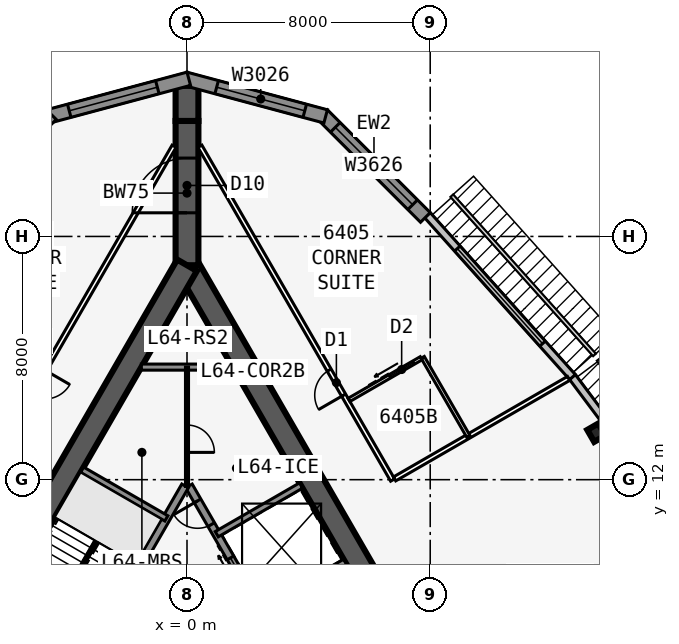
"""IFC4 building model, lengths in metres.
Left out: names, types, materials, properties, quantities, classifications, styles, units other than length and angle.
Written with IfcOpenShell. Run it as: python <this file> out.ifc"""

import sys

from ifc_helpers import new_model, si_unit, direction, frame, frame_2d, origin, origin_2d, place, context, subcontext, project, spatial, polyline, rectangle, i_section, outline, extrude, element, fill, save


model = new_model("IFC4")
c1 = context("Model", 3, precision=1e-05, world=origin(), true_north=direction((0.0, 1.0)))
c2 = subcontext(c1, "Body", "Model", "MODEL_VIEW")
j1 = project(units=[si_unit("LENGTHUNIT", "METRE"), si_unit("PLANEANGLEUNIT", "RADIAN")], contexts=[c1])
p1 = place(None, origin())
s1 = spatial("IfcSite", under=j1, at=p1, CompositionType="ELEMENT")
p2 = place(p1, origin())
s2 = spatial("IfcBuilding", under=s1, at=p2, CompositionType="ELEMENT")
p3 = place(p2, frame((0.0, 0.0, 242.9)))
s3 = spatial("IfcBuildingStorey", under=s2, at=p3, CompositionType="ELEMENT", Elevation=242.9)
p4 = place(p3, frame((16.5, -9.526, 0.0), z_axis=(0.0, 0.0, 1.0), x_axis=(-0.499999749417, 0.866025548458, 0.0)))
e1 = element("IfcWall", 1, at=p4, inside=s3, PredefinedType="SHEAR", context=c2, shape_type="SweptSolid", body=[
    extrude(rectangle(XDim=33.0, YDim=0.75, at=frame_2d((16.5, 0.0))), origin(), (0.0, 0.0, 1.0), 3.6),
])
p5 = place(p4, frame((14.15, 0.0, 0.0)))
e2 = element("IfcOpeningElement", 2, at=p5, cuts=e1, PredefinedType="OPENING", context=c2, shape_type="SweptSolid", body=[
    extrude(rectangle(XDim=1.8, YDim=2.13, at=frame_2d((0.9, 1.065))), frame((0.0, 0.385, 0.0), z_axis=(0.0, -1.0, 0.0), x_axis=(1.0, 0.0, 0.0)), (0.0, 0.0, 1.0), 0.77),
])
p6 = place(p4, frame((12.6, 0.0, 0.0)))
e3 = element("IfcOpeningElement", 3, at=p6, cuts=e1, PredefinedType="OPENING", context=c2, shape_type="SweptSolid", body=[
    extrude(rectangle(XDim=1.0, YDim=2.13, at=frame_2d((0.5, 1.065))), frame((0.0, 0.385, 0.0), z_axis=(0.0, -1.0, 0.0), x_axis=(1.0, 0.0, 0.0)), (0.0, 0.0, 1.0), 0.77),
])
p7 = place(p3, frame((5.379, 2.586, 0.0), z_axis=(0.0, 0.0, 1.0), x_axis=(-0.500001375892, 0.866024609411, 0.0)))
e4 = element("IfcWall", 4, at=p7, inside=s3, PredefinedType="SOLIDWALL", context=c2, shape_type="SweptSolid", body=[
    extrude(rectangle(XDim=10.633, YDim=0.25, at=frame_2d((5.316, 0.0))), origin(), (0.0, 0.0, 1.0), 3.435),
])
p8 = place(p7, frame((9.164, 0.0, 0.0)))
e5 = element("IfcOpeningElement", 5, at=p8, cuts=e4, PredefinedType="OPENING", context=c2, shape_type="SweptSolid", body=[
    extrude(rectangle(XDim=0.9, YDim=2.13, at=frame_2d((0.45, 1.065))), frame((0.0, 0.135, 0.0), z_axis=(0.0, -1.0, 0.0), x_axis=(1.0, 0.0, 0.0)), (0.0, 0.0, 1.0), 0.27),
])
p9 = place(p7, frame((1.0, 0.0, 0.0)))
e6 = element("IfcOpeningElement", 6, at=p9, cuts=e4, PredefinedType="OPENING", context=c2, shape_type="SweptSolid", body=[
    extrude(rectangle(XDim=1.1, YDim=2.13, at=frame_2d((0.55, 1.065))), frame((0.0, 0.135, 0.0), z_axis=(0.0, -1.0, 0.0), x_axis=(1.0, 0.0, 0.0)), (0.0, 0.0, 1.0), 0.27),
])
p10 = place(p7, frame((3.9, 0.0, 0.0)))
e7 = element("IfcOpeningElement", 7, at=p10, cuts=e4, PredefinedType="OPENING", context=c2, shape_type="SweptSolid", body=[
    extrude(rectangle(XDim=1.1, YDim=2.13, at=frame_2d((0.55, 1.065))), frame((0.0, 0.135, 0.0), z_axis=(0.0, -1.0, 0.0), x_axis=(1.0, 0.0, 0.0)), (0.0, 0.0, 1.0), 0.27),
])
p11 = place(p7, frame((6.8, 0.0, 0.0)))
e8 = element("IfcOpeningElement", 8, at=p11, cuts=e4, PredefinedType="OPENING", context=c2, shape_type="SweptSolid", body=[
    extrude(rectangle(XDim=1.1, YDim=2.13, at=frame_2d((0.55, 1.065))), frame((0.0, 0.135, 0.0), z_axis=(0.0, -1.0, 0.0), x_axis=(1.0, 0.0, 0.0)), (0.0, 0.0, 1.0), 0.27),
])
for number, where, z_axis, x_axis in (
    (9, (2.429, 7.696, 0.0), (0.0, 0.0, 1.0), (0.866, 0.5, 0.0)),
    (10, (0.979, 10.207, 0.0), (0.0, 0.0, 1.0), (0.866, 0.5, 0.0)),
):
    element("IfcWall", number, at=place(p3, frame(where, z_axis=z_axis, x_axis=x_axis)), inside=s3, PredefinedType="SOLIDWALL", context=c2, shape_type="SweptSolid", body=[
        extrude(rectangle(XDim=3.2, YDim=0.2, at=frame_2d((1.6, 0.0))), origin(), (0.0, 0.0, 1.0), 3.435),
    ])
p12 = place(p3, frame((0.0, 19.052, 0.0), z_axis=(0.0, 0.0, 1.0), x_axis=(-0.499999749417, -0.866025548458, 0.0)))
e11 = element("IfcWall", 11, at=p12, inside=s3, PredefinedType="SHEAR", context=c2, shape_type="SweptSolid", body=[
    extrude(rectangle(XDim=33.0, YDim=0.75, at=frame_2d((16.5, 0.0))), origin(), (0.0, 0.0, 1.0), 3.6),
])
p13 = place(p12, frame((14.15, 0.0, 0.0)))
e12 = element("IfcOpeningElement", 12, at=p13, cuts=e11, PredefinedType="OPENING", context=c2, shape_type="SweptSolid", body=[
    extrude(rectangle(XDim=1.8, YDim=2.13, at=frame_2d((0.9, 1.065))), frame((0.0, 0.385, 0.0), z_axis=(0.0, -1.0, 0.0), x_axis=(1.0, 0.0, 0.0)), (0.0, 0.0, 1.0), 0.77),
])
p14 = place(p12, frame((12.6, 0.0, 0.0)))
e13 = element("IfcOpeningElement", 13, at=p14, cuts=e11, PredefinedType="OPENING", context=c2, shape_type="SweptSolid", body=[
    extrude(rectangle(XDim=1.0, YDim=2.13, at=frame_2d((0.5, 1.065))), frame((0.0, 0.385, 0.0), z_axis=(0.0, -1.0, 0.0), x_axis=(1.0, 0.0, 0.0)), (0.0, 0.0, 1.0), 0.77),
])
p15 = place(p3, frame((-0.062, 11.794, 0.0), z_axis=(0.0, 0.0, 1.0), x_axis=(-0.500006680225, -0.86602154692, 0.0)))
e14 = element("IfcWall", 14, at=p15, inside=s3, PredefinedType="SOLIDWALL", context=c2, shape_type="SweptSolid", body=[
    extrude(rectangle(XDim=7.733, YDim=0.25, at=frame_2d((3.866, 0.0))), origin(), (0.0, 0.0, 1.0), 3.435),
])
p16 = place(p3, frame((-0.679, 10.727, 0.0), z_axis=(0.0, 0.0, 1.0), x_axis=(-0.866008981251, 0.500028443584, 0.0)))
e15 = element("IfcWall", 15, at=p16, inside=s3, PredefinedType="SOLIDWALL", context=c2, shape_type="SweptSolid", body=[
    extrude(rectangle(XDim=3.2, YDim=0.2, at=frame_2d((1.6, 0.0))), origin(), (0.0, 0.0, 1.0), 3.435),
])
p17 = place(p3, frame((0.0, 19.052, 0.0), z_axis=(0.0, 0.0, 1.0), x_axis=(0.0, 1.0, 0.0)))
e16 = element("IfcWall", 16, at=p17, inside=s3, PredefinedType="SHEAR", context=c2, shape_type="SweptSolid", body=[
    extrude(rectangle(XDim=4.746, YDim=0.75, at=frame_2d((2.373, 0.0))), origin(), (0.0, 0.0, 1.0), 3.6),
])
p18 = place(p17, frame((1.725, 0.0, 0.0)))
e17 = element("IfcOpeningElement", 17, at=p18, cuts=e16, PredefinedType="OPENING", context=c2, shape_type="SweptSolid", body=[
    extrude(rectangle(XDim=1.8, YDim=2.13, at=frame_2d((0.9, 1.065))), frame((0.0, 0.385, 0.0), z_axis=(0.0, -1.0, 0.0), x_axis=(1.0, 0.0, 0.0)), (0.0, 0.0, 1.0), 0.77),
])
p19 = place(p3, frame((0.0, 23.799, 0.0), z_axis=(0.0, 0.0, 1.0), x_axis=(0.0, 1.0, 0.0)))
e18 = element("IfcWall", 18, at=p19, inside=s3, PredefinedType="SHEAR", context=c2, shape_type="SweptSolid", body=[
    extrude(rectangle(XDim=1.155, YDim=0.75, at=frame_2d((0.577, 0.0))), origin(), (0.0, 0.0, 1.0), 3.6),
])
p20 = place(p3, frame((13.461, 13.545, 0.0), z_axis=(0.0, 0.0, 1.0), x_axis=(0.866025403784, 0.5, 0.0)))
e19 = element("IfcColumn", 19, at=p20, inside=s3, PredefinedType="COLUMN", context=c2, shape_type="SweptSolid", body=[
    extrude(i_section(OverallWidth=0.419, OverallDepth=0.455, WebThickness=0.042, FlangeThickness=0.068, at=origin_2d()), origin(), (0.0, 0.0, 1.0), 3.6),
])
p21 = place(p3, frame((13.881, 13.771, 0.0), z_axis=(0.0, 0.0, 1.0), x_axis=(-0.599650843534, 0.800261748335, 0.0)))
e20 = element("IfcWall", 20, at=p21, inside=s3, PredefinedType="STANDARD", context=c2, shape_type="SweptSolid", body=[
    extrude(rectangle(XDim=2.014, YDim=0.25, at=frame_2d((1.007, 0.0))), origin(), (0.0, 0.0, 1.0), 3.435),
])
p22 = place(p3, frame((12.68, 15.374, 0.0), z_axis=(0.0, 0.0, 1.0), x_axis=(-0.667303550892, 0.744785855778, 0.0)))
e21 = element("IfcWall", 21, at=p22, inside=s3, PredefinedType="STANDARD", context=c2, shape_type="SweptSolid", body=[
    extrude(rectangle(XDim=7.153, YDim=0.25, at=frame_2d((3.576, 0.0))), origin(), (0.0, 0.0, 1.0), 3.435),
])
p23 = place(p22, frame((1.476, 0.0, 0.45)))
e22 = element("IfcOpeningElement", 22, at=p23, cuts=e21, PredefinedType="OPENING", context=c2, shape_type="SweptSolid", body=[
    extrude(rectangle(XDim=4.2, YDim=2.6, at=frame_2d((2.1, 1.3))), frame((0.0, 0.135, 0.0), z_axis=(0.0, -1.0, 0.0), x_axis=(1.0, 0.0, 0.0)), (0.0, 0.0, 1.0), 0.27),
])
p24 = place(p3, frame((7.841, 20.625, 0.0), z_axis=(0.0, 0.0, 1.0), x_axis=(-0.707106781187, 0.707106781187, 0.0)))
e23 = element("IfcWall", 23, at=p24, inside=s3, PredefinedType="SOLIDWALL", context=c2, shape_type="SweptSolid", body=[
    extrude(rectangle(XDim=4.781, YDim=0.45, at=frame_2d((2.391, 0.0))), origin(), (0.0, 0.0, 1.0), 3.435),
])
p25 = place(p24, frame((0.591, 0.0, 0.45)))
e24 = element("IfcOpeningElement", 24, at=p25, cuts=e23, PredefinedType="OPENING", context=c2, shape_type="SweptSolid", body=[
    extrude(rectangle(XDim=3.6, YDim=2.6, at=frame_2d((1.8, 1.3))), frame((0.0, 0.235, 0.0), z_axis=(0.0, -1.0, 0.0), x_axis=(1.0, 0.0, 0.0)), (0.0, 0.0, 1.0), 0.47),
])
p26 = place(p3, frame((4.561, 23.948, 0.0), z_axis=(0.0, 0.0, 1.0), x_axis=(-0.965926628191, 0.258816052347, 0.0)))
e25 = element("IfcWall", 25, at=p26, inside=s3, PredefinedType="SOLIDWALL", context=c2, shape_type="SweptSolid", body=[
    extrude(outline(polyline([(4.781, 0.225), (4.722, 0.225), (4.303, 0.113), (4.273, 0.225), (0.0, 0.225), (0.0, -0.225), (4.781, -0.225), (4.781, 0.225)])), origin(), (0.0, 0.0, 1.0), 3.435),
])
p27 = place(p26, frame((0.711, 0.0, 0.45)))
e26 = element("IfcOpeningElement", 26, at=p27, cuts=e25, PredefinedType="OPENING", context=c2, shape_type="SweptSolid", body=[
    extrude(rectangle(XDim=3.0, YDim=2.6, at=frame_2d((1.5, 1.3))), frame((0.0, 0.235, 0.0), z_axis=(0.0, -1.0, 0.0), x_axis=(1.0, 0.0, 0.0)), (0.0, 0.0, 1.0), 0.47),
])
p28 = place(p3, frame((0.058, 25.186, 0.0), z_axis=(0.0, 0.0, 1.0), x_axis=(-0.965926628191, -0.258816052347, 0.0)))
e27 = element("IfcWall", 27, at=p28, inside=s3, PredefinedType="SOLIDWALL", context=c2, shape_type="SweptSolid", body=[
    extrude(outline(polyline([(4.781, 0.225), (0.509, 0.225), (0.479, 0.113), (0.059, 0.225), (0.0, 0.225), (0.0, -0.225), (4.781, -0.225), (4.781, 0.225)])), origin(), (0.0, 0.0, 1.0), 3.435),
])
p29 = place(p28, frame((1.07, 0.0, 0.45)))
e28 = element("IfcOpeningElement", 28, at=p29, cuts=e27, PredefinedType="OPENING", context=c2, shape_type="SweptSolid", body=[
    extrude(rectangle(XDim=3.0, YDim=2.6, at=frame_2d((1.5, 1.3))), frame((0.0, 0.235, 0.0), z_axis=(0.0, -1.0, 0.0), x_axis=(1.0, 0.0, 0.0)), (0.0, 0.0, 1.0), 0.47),
])
p30 = place(p3, frame((-4.46, 24.007, 0.0), z_axis=(0.0, 0.0, 1.0), x_axis=(-0.707106781187, -0.707106781187, 0.0)))
e29 = element("IfcWall", 29, at=p30, inside=s3, PredefinedType="SOLIDWALL", context=c2, shape_type="SweptSolid", body=[
    extrude(rectangle(XDim=4.781, YDim=0.45, at=frame_2d((2.391, 0.0))), origin(), (0.0, 0.0, 1.0), 3.435),
])
p31 = place(p30, frame((0.591, 0.0, 0.45)))
e30 = element("IfcOpeningElement", 30, at=p31, cuts=e29, PredefinedType="OPENING", context=c2, shape_type="SweptSolid", body=[
    extrude(rectangle(XDim=3.6, YDim=2.6, at=frame_2d((1.8, 1.3))), frame((0.0, 0.235, 0.0), z_axis=(0.0, -1.0, 0.0), x_axis=(1.0, 0.0, 0.0)), (0.0, 0.0, 1.0), 0.47),
])
p32 = place(p3, frame((6.763, 11.988, 0.0), z_axis=(0.0, 0.0, 1.0), x_axis=(-0.49999585592, 0.866027796357, 0.0)))
e31 = element("IfcWall", 31, at=p32, inside=s3, PredefinedType="PARTITIONING", context=c2, shape_type="SweptSolid", body=[
    extrude(rectangle(XDim=12.677, YDim=0.15, at=frame_2d((6.338, 0.0))), origin(), (0.0, 0.0, 1.0), 3.435),
])
p33 = place(p32, frame((3.225, 0.0, 0.0)))
e32 = element("IfcOpeningElement", 32, at=p33, cuts=e31, PredefinedType="OPENING", context=c2, shape_type="SweptSolid", body=[
    extrude(rectangle(XDim=0.95, YDim=2.13, at=frame_2d((0.475, 1.065))), frame((0.0, 0.085, 0.0), z_axis=(0.0, -1.0, 0.0), x_axis=(1.0, 0.0, 0.0)), (0.0, 0.0, 1.0), 0.17),
])
p34 = place(p3, frame((6.829, 12.025, 0.0), z_axis=(0.0, 0.0, 1.0), x_axis=(0.866029323189, 0.499993211332, 0.0)))
e33 = element("IfcWall", 33, at=p34, inside=s3, PredefinedType="PARTITIONING", context=c2, shape_type="SweptSolid", body=[
    extrude(rectangle(XDim=6.608, YDim=0.15, at=frame_2d((3.304, 0.0))), origin(), (0.0, 0.0, 1.0), 2.678),
])
p35 = place(p3, frame((9.253, 13.425, 0.0), z_axis=(0.0, 0.0, 1.0), x_axis=(-0.499990139034, 0.866031096941, 0.0)))
e34 = element("IfcWall", 34, at=p35, inside=s3, PredefinedType="PLUMBINGWALL", context=c2, shape_type="SweptSolid", body=[
    extrude(rectangle(XDim=3.0, YDim=0.12, at=frame_2d((1.5, 0.0))), origin(), (0.0, 0.0, 1.0), 3.435),
])
p36 = place(p3, frame((5.329, 14.623, 0.0), z_axis=(0.0, 0.0, 1.0), x_axis=(0.865997131366, 0.500048966069, 0.0)))
e35 = element("IfcWall", 35, at=p36, inside=s3, PredefinedType="PLUMBINGWALL", context=c2, shape_type="SweptSolid", body=[
    extrude(rectangle(XDim=2.74, YDim=0.12, at=frame_2d((1.37, 0.0))), origin(), (0.0, 0.0, 1.0), 3.435),
])
p37 = place(p36, frame((1.55, 0.0, 0.0)))
e36 = element("IfcOpeningElement", 36, at=p37, cuts=e35, PredefinedType="OPENING", context=c2, shape_type="SweptSolid", body=[
    extrude(rectangle(XDim=0.9, YDim=2.13, at=frame_2d((0.45, 1.065))), frame((0.0, 0.07, 0.0), z_axis=(0.0, -1.0, 0.0), x_axis=(1.0, 0.0, 0.0)), (0.0, 0.0, 1.0), 0.14),
])
p38 = place(p3, frame((-0.425, 22.966, 0.0), z_axis=(0.0, 0.0, 1.0), x_axis=(-0.500000265775, -0.866025250339, 0.0)))
e37 = element("IfcWall", 37, at=p38, inside=s3, PredefinedType="PARTITIONING", context=c2, shape_type="SweptSolid", body=[
    extrude(rectangle(XDim=39.354, YDim=0.15, at=frame_2d((19.677, 0.0))), origin(), (0.0, 0.0, 1.0), 3.435),
])
p39 = place(p38, frame((8.502, 0.0, 0.0)))
e38 = element("IfcOpeningElement", 38, at=p39, cuts=e37, PredefinedType="OPENING", context=c2, shape_type="SweptSolid", body=[
    extrude(rectangle(XDim=0.95, YDim=2.13, at=frame_2d((0.475, 1.065))), frame((0.0, 0.085, 0.0), z_axis=(0.0, -1.0, 0.0), x_axis=(1.0, 0.0, 0.0)), (0.0, 0.0, 1.0), 0.17),
])
p40 = place(p38, frame((15.902, 0.0, 0.0)))
e39 = element("IfcOpeningElement", 39, at=p40, cuts=e37, PredefinedType="OPENING", context=c2, shape_type="SweptSolid", body=[
    extrude(rectangle(XDim=0.95, YDim=2.13, at=frame_2d((0.475, 1.065))), frame((0.0, 0.085, 0.0), z_axis=(0.0, -1.0, 0.0), x_axis=(1.0, 0.0, 0.0)), (0.0, 0.0, 1.0), 0.17),
])
p41 = place(p38, frame((22.902, 0.0, 0.0)))
e40 = element("IfcOpeningElement", 40, at=p41, cuts=e37, PredefinedType="OPENING", context=c2, shape_type="SweptSolid", body=[
    extrude(rectangle(XDim=0.95, YDim=2.13, at=frame_2d((0.475, 1.065))), frame((0.0, 0.085, 0.0), z_axis=(0.0, -1.0, 0.0), x_axis=(1.0, 0.0, 0.0)), (0.0, 0.0, 1.0), 0.17),
])
p42 = place(p38, frame((29.902, 0.0, 0.0)))
e41 = element("IfcOpeningElement", 41, at=p42, cuts=e37, PredefinedType="OPENING", context=c2, shape_type="SweptSolid", body=[
    extrude(rectangle(XDim=0.95, YDim=2.13, at=frame_2d((0.475, 1.065))), frame((0.0, 0.085, 0.0), z_axis=(0.0, -1.0, 0.0), x_axis=(1.0, 0.0, 0.0)), (0.0, 0.0, 1.0), 0.17),
])
p43 = place(p3, frame((-1.501, 15.703, 0.0), z_axis=(0.0, 0.0, 1.0), x_axis=(1.0, 0.0, 0.0)))
e42 = element("IfcWall", 42, at=p43, inside=s3, PredefinedType="SOLIDWALL", context=c2, shape_type="SweptSolid", body=[
    extrude(rectangle(XDim=3.002, YDim=0.2, at=frame_2d((1.501, 0.0))), origin(), (0.0, 0.0, 1.0), 3.435),
])
p44 = place(p3, frame((0.0, 15.703, 0.0), z_axis=(0.0, 0.0, 1.0), x_axis=(0.0, -1.0, 0.0)))
e43 = element("IfcWall", 43, at=p44, inside=s3, PredefinedType="PARTITIONING", context=c2, shape_type="SweptSolid", body=[
    extrude(rectangle(XDim=3.925, YDim=0.1, at=frame_2d((1.963, 0.0))), origin(), (0.0, 0.0, 1.0), 3.435),
])
p45 = place(p44, frame((1.905, 0.0, 0.0)))
e44 = element("IfcOpeningElement", 44, at=p45, cuts=e43, PredefinedType="OPENING", context=c2, shape_type="SweptSolid", body=[
    extrude(rectangle(XDim=0.9, YDim=2.13, at=frame_2d((0.45, 1.065))), frame((0.0, 0.06, 0.0), z_axis=(0.0, -1.0, 0.0), x_axis=(1.0, 0.0, 0.0)), (0.0, 0.0, 1.0), 0.12),
])
p46 = place(p3, frame((-2.988, 9.978, 0.0), z_axis=(0.0, 0.0, 1.0), x_axis=(-0.499992232847, -0.866029888106, 0.0)))
e45 = element("IfcWall", 45, at=p46, inside=s3, PredefinedType="SOLIDWALL", context=c2, shape_type="SweptSolid", body=[
    extrude(rectangle(XDim=2.794, YDim=0.1, at=frame_2d((1.397, 0.0))), origin(), (0.0, 0.0, 1.0), 3.6),
])
p47 = place(p23, origin())
e46 = element("IfcWindow", 46, at=p47, inside=s3, PartitioningType="SINGLE_PANEL", PredefinedType="WINDOW", context=c2, shape_type="SweptSolid", body=[
    extrude(rectangle(XDim=4.2, YDim=2.6, at=frame_2d((2.1, 1.3))), frame((0.0, 0.03, 0.0), z_axis=(0.0, -1.0, 0.0), x_axis=(1.0, 0.0, 0.0)), (0.0, 0.0, 1.0), 0.06),
])
fill(e22, e46)
p48 = place(p25, origin())
e47 = element("IfcWindow", 47, at=p48, inside=s3, PartitioningType="SINGLE_PANEL", PredefinedType="WINDOW", context=c2, shape_type="SweptSolid", body=[
    extrude(rectangle(XDim=3.6, YDim=2.6, at=frame_2d((1.8, 1.3))), frame((0.0, 0.03, 0.0), z_axis=(0.0, -1.0, 0.0), x_axis=(1.0, 0.0, 0.0)), (0.0, 0.0, 1.0), 0.06),
])
fill(e24, e47)
p49 = place(p27, origin())
e48 = element("IfcWindow", 48, at=p49, inside=s3, PartitioningType="SINGLE_PANEL", PredefinedType="WINDOW", context=c2, shape_type="SweptSolid", body=[
    extrude(rectangle(XDim=3.0, YDim=2.6, at=frame_2d((1.5, 1.3))), frame((0.0, 0.03, 0.0), z_axis=(0.0, -1.0, 0.0), x_axis=(1.0, 0.0, 0.0)), (0.0, 0.0, 1.0), 0.06),
])
fill(e26, e48)
p50 = place(p29, origin())
e49 = element("IfcWindow", 49, at=p50, inside=s3, PartitioningType="SINGLE_PANEL", PredefinedType="WINDOW", context=c2, shape_type="SweptSolid", body=[
    extrude(rectangle(XDim=3.0, YDim=2.6, at=frame_2d((1.5, 1.3))), frame((0.0, 0.03, 0.0), z_axis=(0.0, -1.0, 0.0), x_axis=(1.0, 0.0, 0.0)), (0.0, 0.0, 1.0), 0.06),
])
fill(e28, e49)
p51 = place(p37, origin())
e50 = element("IfcDoor", 50, at=p51, inside=s3, OperationType="SLIDING_TO_LEFT", PredefinedType="DOOR", context=c2, shape_type="SweptSolid", body=[
    extrude(rectangle(XDim=0.9, YDim=2.13, at=frame_2d((0.45, 1.065))), frame((0.0, 0.025, 0.0), z_axis=(0.0, -1.0, 0.0), x_axis=(1.0, 0.0, 0.0)), (0.0, 0.0, 1.0), 0.05),
])
fill(e36, e50)
p52 = place(p33, origin())
e51 = element("IfcDoor", 51, at=p52, inside=s3, OperationType="SINGLE_SWING_LEFT", PredefinedType="DOOR", context=c2, shape_type="SweptSolid", body=[
    extrude(rectangle(XDim=0.95, YDim=2.13, at=frame_2d((0.475, 1.065))), frame((0.0, 0.025, 0.0), z_axis=(0.0, -1.0, 0.0), x_axis=(1.0, 0.0, 0.0)), (0.0, 0.0, 1.0), 0.05),
])
fill(e32, e51)
p53 = place(p18, origin())
e52 = element("IfcDoor", 52, at=p53, inside=s3, OperationType="DOUBLE_DOOR_DOUBLE_SWING", PredefinedType="DOOR", context=c2, shape_type="SweptSolid", body=[
    extrude(rectangle(XDim=1.8, YDim=2.13, at=frame_2d((0.9, 1.065))), frame((0.0, 0.025, 0.0), z_axis=(0.0, -1.0, 0.0), x_axis=(1.0, 0.0, 0.0)), (0.0, 0.0, 1.0), 0.05),
])
fill(e17, e52)
p54 = place(p8, origin())
e53 = element("IfcDoor", 53, at=p54, inside=s3, OperationType="SINGLE_SWING_RIGHT", PredefinedType="DOOR", context=c2, shape_type="SweptSolid", body=[
    extrude(rectangle(XDim=0.9, YDim=2.13, at=frame_2d((0.45, 1.065))), frame((0.0, 0.025, 0.0), z_axis=(0.0, -1.0, 0.0), x_axis=(1.0, 0.0, 0.0)), (0.0, 0.0, 1.0), 0.05),
])
fill(e5, e53)
p55 = place(p45, origin())
e54 = element("IfcDoor", 54, at=p55, inside=s3, OperationType="SINGLE_SWING_RIGHT", PredefinedType="DOOR", context=c2, shape_type="SweptSolid", body=[
    extrude(rectangle(XDim=0.9, YDim=2.13, at=frame_2d((0.45, 1.065))), frame((0.0, 0.025, 0.0), z_axis=(0.0, -1.0, 0.0), x_axis=(1.0, 0.0, 0.0)), (0.0, 0.0, 1.0), 0.05),
])
fill(e44, e54)
p56 = place(p11, origin())
e55 = element("IfcDoor", 55, at=p56, inside=s3, OperationType="DOUBLE_DOOR_SLIDING", PredefinedType="USERDEFINED", context=c2, shape_type="SweptSolid", body=[
    extrude(rectangle(XDim=1.1, YDim=2.13, at=frame_2d((0.55, 1.065))), frame((0.0, 0.025, 0.0), z_axis=(0.0, -1.0, 0.0), x_axis=(1.0, 0.0, 0.0)), (0.0, 0.0, 1.0), 0.05),
])
fill(e8, e55)
save(model, sys.argv[1])
